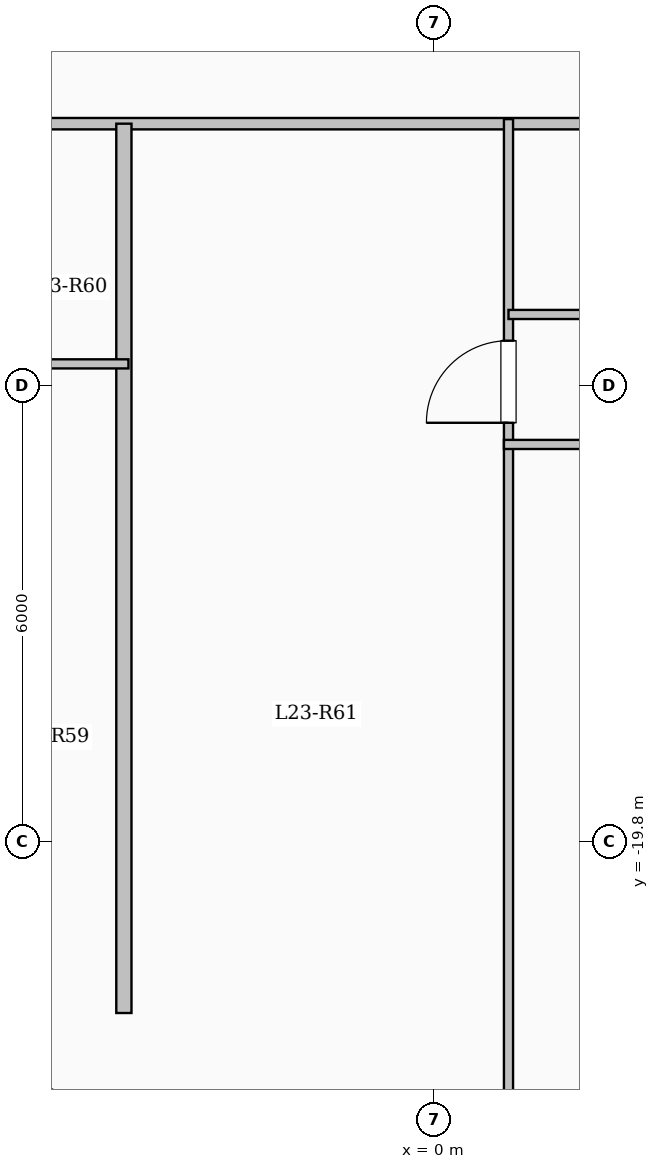
"""IFC4 building model, lengths in metres.
Left out: names, types, materials, properties, quantities, classifications, styles, units other than length and angle.
Written with IfcOpenShell. Run it as: python <this file> out.ifc"""

import sys

from ifc_helpers import new_model, si_unit, direction, frame, frame_2d, origin, place, context, subcontext, project, spatial, rectangle, extrude, element, fill, save


model = new_model("IFC4")
c1 = context("Model", 3, precision=1e-05, world=origin(), true_north=direction((0.0, 1.0)))
c2 = subcontext(c1, "Body", "Model", "MODEL_VIEW")
j1 = project(units=[si_unit("LENGTHUNIT", "METRE"), si_unit("PLANEANGLEUNIT", "RADIAN")], contexts=[c1])
p1 = place(None, origin())
s1 = spatial("IfcSite", under=j1, at=p1, CompositionType="ELEMENT")
p2 = place(p1, origin())
s2 = spatial("IfcBuilding", under=s1, at=p2, CompositionType="ELEMENT")
p3 = place(p2, frame((0.0, 0.0, 88.35)))
s3 = spatial("IfcBuildingStorey", under=s2, at=p3, CompositionType="ELEMENT", Elevation=88.35)
p4 = place(p3, frame((-4.35, -23.55, 0.0), z_axis=(0.0, 0.0, 1.0), x_axis=(-0.894427191, 0.4472135955, 0.0)))
e1 = element("IfcWall", 1, at=p4, inside=s3, PredefinedType="SOLIDWALL", context=c2, shape_type="SweptSolid", body=[
    extrude(rectangle(XDim=3.354, YDim=0.28, at=frame_2d((1.677, 0.0))), origin(), (0.0, 0.0, 1.0), 3.1),
])
p5 = place(p4, frame((2.124, 0.0, 0.95)))
e2 = element("IfcOpeningElement", 2, at=p5, cuts=e1, PredefinedType="OPENING", context=c2, shape_type="SweptSolid", body=[
    extrude(rectangle(XDim=0.85, YDim=1.5, at=frame_2d((0.425, 0.75))), frame((0.0, 0.15, 0.0), z_axis=(0.0, -1.0, 0.0), x_axis=(1.0, 0.0, 0.0)), (0.0, 0.0, 1.0), 0.3),
])
p6 = place(p3, frame((-8.55, -10.35, 0.0), z_axis=(0.0, 0.0, 1.0), x_axis=(1.0, 0.0, 0.0)))
e3 = element("IfcWall", 3, at=p6, inside=s3, PredefinedType="PARTITIONING", context=c2, shape_type="SweptSolid", body=[
    extrude(rectangle(XDim=17.1, YDim=0.15, at=frame_2d((8.55, 0.0))), origin(), (0.0, 0.0, 1.0), 3.1),
])
p7 = place(p6, frame((1.15, 0.0, 0.0)))
e4 = element("IfcOpeningElement", 4, at=p7, cuts=e3, PredefinedType="OPENING", context=c2, shape_type="SweptSolid", body=[
    extrude(rectangle(XDim=0.96, YDim=2.15, at=frame_2d((0.48, 1.075))), frame((0.0, 0.085, 0.0), z_axis=(0.0, -1.0, 0.0), x_axis=(1.0, 0.0, 0.0)), (0.0, 0.0, 1.0), 0.17),
])
p8 = place(p6, frame((10.5, 0.0, 0.0)))
e5 = element("IfcOpeningElement", 5, at=p8, cuts=e3, PredefinedType="OPENING", context=c2, shape_type="SweptSolid", body=[
    extrude(rectangle(XDim=0.96, YDim=2.15, at=frame_2d((0.48, 1.075))), frame((0.0, 0.085, 0.0), z_axis=(0.0, -1.0, 0.0), x_axis=(1.0, 0.0, 0.0)), (0.0, 0.0, 1.0), 0.17),
])
p9 = place(p3, frame((-4.08, -22.05, 0.0), z_axis=(0.0, 0.0, 1.0), x_axis=(0.0, 1.0, 0.0)))
e6 = element("IfcWall", 6, at=p9, inside=s3, PredefinedType="SOLIDWALL", context=c2, shape_type="SweptSolid", body=[
    extrude(rectangle(XDim=11.7, YDim=0.2, at=frame_2d((5.85, 0.0))), origin(), (0.0, 0.0, 1.0), 3.1),
])
p10 = place(p3, frame((-6.14, -13.51, 0.0), z_axis=(0.0, 0.0, 1.0), x_axis=(1.0, 0.0, 0.0)))
e7 = element("IfcWall", 7, at=p10, inside=s3, PredefinedType="PARTITIONING", context=c2, shape_type="SweptSolid", body=[
    extrude(rectangle(XDim=2.12, YDim=0.12, at=frame_2d((1.06, 0.0))), origin(), (0.0, 0.0, 1.0), 3.1),
])
p11 = place(p3, frame((0.98, -23.58, 0.0), z_axis=(0.0, 0.0, 1.0), x_axis=(0.0, 1.0, 0.0)))
e8 = element("IfcWall", 8, at=p11, inside=s3, PredefinedType="PARTITIONING", context=c2, shape_type="SweptSolid", body=[
    extrude(rectangle(XDim=13.29, YDim=0.12, at=frame_2d((6.645, 0.0))), origin(), (0.0, 0.0, 1.0), 3.1),
])
p12 = place(p11, frame((9.295, 0.0, 0.0)))
e9 = element("IfcOpeningElement", 9, at=p12, cuts=e8, PredefinedType="OPENING", context=c2, shape_type="SweptSolid", body=[
    extrude(rectangle(XDim=1.08, YDim=2.15, at=frame_2d((0.54, 1.075))), frame((0.0, 0.07, 0.0), z_axis=(0.0, -1.0, 0.0), x_axis=(1.0, 0.0, 0.0)), (0.0, 0.0, 1.0), 0.14),
])
p13 = place(p3, frame((0.98, -12.86, 0.0), z_axis=(0.0, 0.0, 1.0), x_axis=(1.0, 0.0, 0.0)))
e10 = element("IfcWall", 10, at=p13, inside=s3, PredefinedType="PARTITIONING", context=c2, shape_type="SweptSolid", body=[
    extrude(rectangle(XDim=4.275, YDim=0.12, at=frame_2d((2.137, 0.0))), origin(), (0.0, 0.0, 1.0), 3.1),
])
p14 = place(p13, frame((1.698, 0.0, 0.0)))
e11 = element("IfcOpeningElement", 11, at=p14, cuts=e10, PredefinedType="OPENING", context=c2, shape_type="SweptSolid", body=[
    extrude(rectangle(XDim=0.88, YDim=2.1, at=frame_2d((0.44, 1.05))), frame((0.0, 0.07, 0.0), z_axis=(0.0, -1.0, 0.0), x_axis=(1.0, 0.0, 0.0)), (0.0, 0.0, 1.0), 0.14),
])
p15 = place(p3, frame((0.92, -14.57, 0.0), z_axis=(0.0, 0.0, 1.0), x_axis=(1.0, 0.0, 0.0)))
e12 = element("IfcWall", 12, at=p15, inside=s3, PredefinedType="PARTITIONING", context=c2, shape_type="SweptSolid", body=[
    extrude(rectangle(XDim=7.69, YDim=0.12, at=frame_2d((3.845, 0.0))), origin(), (0.0, 0.0, 1.0), 2.635),
])
p16 = place(p15, frame((1.435, 0.0, 0.0)))
e13 = element("IfcOpeningElement", 13, at=p16, cuts=e12, PredefinedType="OPENING", context=c2, shape_type="SweptSolid", body=[
    extrude(rectangle(XDim=0.88, YDim=2.1, at=frame_2d((0.44, 1.05))), frame((0.0, 0.07, 0.0), z_axis=(0.0, -1.0, 0.0), x_axis=(1.0, 0.0, 0.0)), (0.0, 0.0, 1.0), 0.14),
])
p17 = place(p15, frame((5.185, 0.0, 0.0)))
e14 = element("IfcOpeningElement", 14, at=p17, cuts=e12, PredefinedType="OPENING", context=c2, shape_type="SweptSolid", body=[
    extrude(rectangle(XDim=0.88, YDim=2.1, at=frame_2d((0.44, 1.05))), frame((0.0, 0.07, 0.0), z_axis=(0.0, -1.0, 0.0), x_axis=(1.0, 0.0, 0.0)), (0.0, 0.0, 1.0), 0.14),
])
p18 = place(p12, origin())
e15 = element("IfcDoor", 15, at=p18, inside=s3, OperationType="SINGLE_SWING_LEFT", PredefinedType="DOOR", context=c2, shape_type="SweptSolid", body=[
    extrude(rectangle(XDim=1.08, YDim=2.15, at=frame_2d((0.54, 1.075))), frame((0.0, 0.025, 0.0), z_axis=(0.0, -1.0, 0.0), x_axis=(1.0, 0.0, 0.0)), (0.0, 0.0, 1.0), 0.05),
])
fill(e9, e15)
save(model, sys.argv[1])
